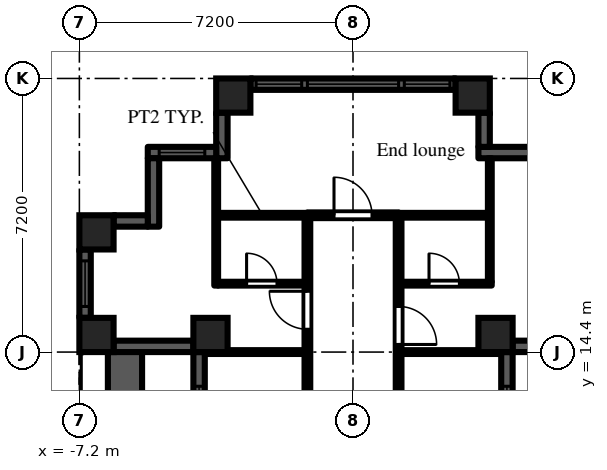
"""IFC4 building model, lengths in metres.
Left out: names, types, materials, properties, quantities, classifications, styles, units other than length and angle.
Written with IfcOpenShell. Run it as: python <this file> out.ifc"""

import sys

from ifc_helpers import new_model, si_unit, direction, frame, frame_2d, origin, origin_2d, place, context, subcontext, project, spatial, rectangle, extrude, element, fill, save


model = new_model("IFC4")
c1 = context("Model", 3, precision=1e-05, world=origin(), true_north=direction((0.0, 1.0)))
c2 = subcontext(c1, "Body", "Model", "MODEL_VIEW")
j1 = project(units=[si_unit("LENGTHUNIT", "METRE"), si_unit("PLANEANGLEUNIT", "RADIAN")], contexts=[c1])
p1 = place(None, origin())
s1 = spatial("IfcSite", under=j1, at=p1, CompositionType="ELEMENT")
p2 = place(p1, origin())
s2 = spatial("IfcBuilding", under=s1, at=p2, CompositionType="ELEMENT")
p3 = place(p2, frame((0.0, 0.0, 69.9)))
s3 = spatial("IfcBuildingStorey", under=s2, at=p3, CompositionType="ELEMENT", Elevation=69.9)
for number, where, z_axis, x_axis in (
    (1, (-6.75, 14.85, 0.0), (0.0, 0.0, 1.0), (1.0, 0.0, 0.0)),
    (2, (-6.75, 17.55, 0.0), (0.0, 0.0, 1.0), (1.0, 0.0, 0.0)),
    (3, (-3.75, 14.85, 0.0), (0.0, 0.0, 1.0), (1.0, 0.0, 0.0)),
    (4, (-3.15, 21.15, 0.0), (0.0, 0.0, 1.0), (1.0, 0.0, 0.0)),
    (5, (3.15, 21.15, 0.0), (0.0, 0.0, 1.0), (1.0, 0.0, 0.0)),
    (6, (3.75, 14.85, 0.0), (0.0, 0.0, 1.0), (1.0, 0.0, 0.0)),
):
    element("IfcColumn", number, at=place(p3, frame(where, z_axis=z_axis, x_axis=x_axis)), inside=s3, PredefinedType="COLUMN", context=c2, shape_type="SweptSolid", body=[
        extrude(rectangle(XDim=0.9, YDim=0.9, at=origin_2d()), origin(), (0.0, 0.0, 1.0), 3.0),
    ])
p4 = place(p3, frame((4.05, 7.2, 0.0), z_axis=(0.0, 0.0, 1.0), x_axis=(0.0, 1.0, 0.0)))
e7 = element("IfcWall", 7, at=p4, inside=s3, PredefinedType="SOLIDWALL", context=c2, shape_type="SweptSolid", body=[
    extrude(rectangle(XDim=7.2, YDim=0.3, at=frame_2d((3.6, 0.0))), origin(), (0.0, 0.0, 1.0), 2.1),
])
p5 = place(p4, frame((3.0, 0.0, 0.0)))
e8 = element("IfcOpeningElement", 8, at=p5, cuts=e7, PredefinedType="OPENING", context=c2, shape_type="SweptSolid", body=[
    extrude(rectangle(XDim=1.2, YDim=2.05, at=frame_2d((0.6, 1.025))), frame((0.0, 0.16, 0.0), z_axis=(0.0, -1.0, 0.0), x_axis=(1.0, 0.0, 0.0)), (0.0, 0.0, 1.0), 0.32),
])
p6 = place(p4, frame((0.9, 0.0, 0.2)))
e9 = element("IfcOpeningElement", 9, at=p6, cuts=e7, PredefinedType="OPENING", context=c2, shape_type="SweptSolid", body=[
    extrude(rectangle(XDim=1.8, YDim=1.85, at=frame_2d((0.9, 0.925))), frame((0.0, 0.16, 0.0), z_axis=(0.0, -1.0, 0.0), x_axis=(1.0, 0.0, 0.0)), (0.0, 0.0, 1.0), 0.32),
])
p7 = place(p4, frame((4.5, 0.0, 0.2)))
e10 = element("IfcOpeningElement", 10, at=p7, cuts=e7, PredefinedType="OPENING", context=c2, shape_type="SweptSolid", body=[
    extrude(rectangle(XDim=1.8, YDim=1.85, at=frame_2d((0.9, 0.925))), frame((0.0, 0.16, 0.0), z_axis=(0.0, -1.0, 0.0), x_axis=(1.0, 0.0, 0.0)), (0.0, 0.0, 1.0), 0.32),
])
p8 = place(p3, frame((4.2, 14.55, 0.0), z_axis=(0.0, 0.0, 1.0), x_axis=(1.0, 0.0, 0.0)))
e11 = element("IfcWall", 11, at=p8, inside=s3, PredefinedType="SOLIDWALL", context=c2, shape_type="SweptSolid", body=[
    extrude(rectangle(XDim=2.1, YDim=0.3, at=frame_2d((1.05, 0.0))), origin(), (0.0, 0.0, 1.0), 2.1),
])
p9 = place(p3, frame((5.1, 19.65, 0.0), z_axis=(0.0, 0.0, 1.0), x_axis=(-1.0, 0.0, 0.0)))
e12 = element("IfcWall", 12, at=p9, inside=s3, PredefinedType="SOLIDWALL", context=c2, shape_type="SweptSolid", body=[
    extrude(rectangle(XDim=1.8, YDim=0.3, at=frame_2d((0.9, 0.0))), origin(), (0.0, 0.0, 1.0), 2.575),
])
p10 = place(p3, frame((3.45, 19.8, 0.0), z_axis=(0.0, 0.0, 1.0), x_axis=(0.0, 1.0, 0.0)))
e13 = element("IfcWall", 13, at=p10, inside=s3, PredefinedType="SOLIDWALL", context=c2, shape_type="SweptSolid", body=[
    extrude(rectangle(XDim=0.9, YDim=0.3, at=frame_2d((0.45, 0.0))), origin(), (0.0, 0.0, 1.0), 2.575),
])
p11 = place(p3, frame((2.7, 21.45, 0.0), z_axis=(0.0, 0.0, 1.0), x_axis=(-1.0, 0.0, 0.0)))
e14 = element("IfcWall", 14, at=p11, inside=s3, PredefinedType="SOLIDWALL", context=c2, shape_type="SweptSolid", body=[
    extrude(rectangle(XDim=5.4, YDim=0.3, at=frame_2d((2.7, 0.0))), origin(), (0.0, 0.0, 1.0), 2.1),
])
p12 = place(p11, frame((1.5, 0.0, 0.2)))
e15 = element("IfcOpeningElement", 15, at=p12, cuts=e14, PredefinedType="OPENING", context=c2, shape_type="SweptSolid", body=[
    extrude(rectangle(XDim=2.4, YDim=1.85, at=frame_2d((1.2, 0.925))), frame((0.0, 0.16, 0.0), z_axis=(0.0, -1.0, 0.0), x_axis=(1.0, 0.0, 0.0)), (0.0, 0.0, 1.0), 0.32),
])
p13 = place(p11, frame((0.15, 0.0, 0.2)))
e16 = element("IfcOpeningElement", 16, at=p13, cuts=e14, PredefinedType="OPENING", context=c2, shape_type="SweptSolid", body=[
    extrude(rectangle(XDim=1.2, YDim=1.85, at=frame_2d((0.6, 0.925))), frame((0.0, 0.16, 0.0), z_axis=(0.0, -1.0, 0.0), x_axis=(1.0, 0.0, 0.0)), (0.0, 0.0, 1.0), 0.32),
])
p14 = place(p11, frame((4.05, 0.0, 0.2)))
e17 = element("IfcOpeningElement", 17, at=p14, cuts=e14, PredefinedType="OPENING", context=c2, shape_type="SweptSolid", body=[
    extrude(rectangle(XDim=1.2, YDim=1.85, at=frame_2d((0.6, 0.925))), frame((0.0, 0.16, 0.0), z_axis=(0.0, -1.0, 0.0), x_axis=(1.0, 0.0, 0.0)), (0.0, 0.0, 1.0), 0.32),
])
p15 = place(p3, frame((-3.45, 20.7, 0.0), z_axis=(0.0, 0.0, 1.0), x_axis=(0.0, -1.0, 0.0)))
e18 = element("IfcWall", 18, at=p15, inside=s3, PredefinedType="SOLIDWALL", context=c2, shape_type="SweptSolid", body=[
    extrude(rectangle(XDim=1.2, YDim=0.3, at=frame_2d((0.6, 0.0))), origin(), (0.0, 0.0, 1.0), 2.575),
])
p16 = place(p3, frame((-3.6, 19.65, 0.0), z_axis=(0.0, 0.0, 1.0), x_axis=(-1.0, 0.0, 0.0)))
e19 = element("IfcWall", 19, at=p16, inside=s3, PredefinedType="SOLIDWALL", context=c2, shape_type="SweptSolid", body=[
    extrude(rectangle(XDim=1.8, YDim=0.3, at=frame_2d((0.9, 0.0))), origin(), (0.0, 0.0, 1.0), 2.575),
])
p17 = place(p16, frame((0.3, 0.0, 0.2)))
e20 = element("IfcOpeningElement", 20, at=p17, cuts=e19, PredefinedType="OPENING", context=c2, shape_type="SweptSolid", body=[
    extrude(rectangle(XDim=1.2, YDim=1.85, at=frame_2d((0.6, 0.925))), frame((0.0, 0.16, 0.0), z_axis=(0.0, -1.0, 0.0), x_axis=(1.0, 0.0, 0.0)), (0.0, 0.0, 1.0), 0.32),
])
p18 = place(p3, frame((-5.25, 19.5, 0.0), z_axis=(0.0, 0.0, 1.0), x_axis=(0.0, -1.0, 0.0)))
e21 = element("IfcWall", 21, at=p18, inside=s3, PredefinedType="SOLIDWALL", context=c2, shape_type="SweptSolid", body=[
    extrude(rectangle(XDim=1.8, YDim=0.3, at=frame_2d((0.9, 0.0))), origin(), (0.0, 0.0, 1.0), 2.575),
])
p19 = place(p3, frame((-5.4, 17.85, 0.0), z_axis=(0.0, 0.0, 1.0), x_axis=(-1.0, 0.0, 0.0)))
e22 = element("IfcWall", 22, at=p19, inside=s3, PredefinedType="SOLIDWALL", context=c2, shape_type="SweptSolid", body=[
    extrude(rectangle(XDim=0.9, YDim=0.3, at=frame_2d((0.45, 0.0))), origin(), (0.0, 0.0, 1.0), 2.575),
])
p20 = place(p3, frame((-7.05, 17.1, 0.0), z_axis=(0.0, 0.0, 1.0), x_axis=(0.0, -1.0, 0.0)))
e23 = element("IfcWall", 23, at=p20, inside=s3, PredefinedType="SOLIDWALL", context=c2, shape_type="SweptSolid", body=[
    extrude(rectangle(XDim=1.8, YDim=0.3, at=frame_2d((0.9, 0.0))), origin(), (0.0, 0.0, 1.0), 2.1),
])
p21 = place(p20, frame((0.3, 0.0, 0.2)))
e24 = element("IfcOpeningElement", 24, at=p21, cuts=e23, PredefinedType="OPENING", context=c2, shape_type="SweptSolid", body=[
    extrude(rectangle(XDim=1.2, YDim=1.85, at=frame_2d((0.6, 0.925))), frame((0.0, 0.16, 0.0), z_axis=(0.0, -1.0, 0.0), x_axis=(1.0, 0.0, 0.0)), (0.0, 0.0, 1.0), 0.32),
])
p22 = place(p3, frame((-6.3, 14.55, 0.0), z_axis=(0.0, 0.0, 1.0), x_axis=(1.0, 0.0, 0.0)))
e25 = element("IfcWall", 25, at=p22, inside=s3, PredefinedType="SOLIDWALL", context=c2, shape_type="SweptSolid", body=[
    extrude(rectangle(XDim=2.1, YDim=0.3, at=frame_2d((1.05, 0.0))), origin(), (0.0, 0.0, 1.0), 2.1),
])
p23 = place(p3, frame((-4.05, 14.4, 0.0), z_axis=(0.0, 0.0, 1.0), x_axis=(0.0, -1.0, 0.0)))
e26 = element("IfcWall", 26, at=p23, inside=s3, PredefinedType="SOLIDWALL", context=c2, shape_type="SweptSolid", body=[
    extrude(rectangle(XDim=7.2, YDim=0.3, at=frame_2d((3.6, 0.0))), origin(), (0.0, 0.0, 1.0), 2.1),
])
p24 = place(p23, frame((3.0, 0.0, 0.0)))
e27 = element("IfcOpeningElement", 27, at=p24, cuts=e26, PredefinedType="OPENING", context=c2, shape_type="SweptSolid", body=[
    extrude(rectangle(XDim=1.2, YDim=2.05, at=frame_2d((0.6, 1.025))), frame((0.0, 0.16, 0.0), z_axis=(0.0, -1.0, 0.0), x_axis=(1.0, 0.0, 0.0)), (0.0, 0.0, 1.0), 0.32),
])
p25 = place(p23, frame((0.9, 0.0, 0.2)))
e28 = element("IfcOpeningElement", 28, at=p25, cuts=e26, PredefinedType="OPENING", context=c2, shape_type="SweptSolid", body=[
    extrude(rectangle(XDim=1.8, YDim=1.85, at=frame_2d((0.9, 0.925))), frame((0.0, 0.16, 0.0), z_axis=(0.0, -1.0, 0.0), x_axis=(1.0, 0.0, 0.0)), (0.0, 0.0, 1.0), 0.32),
])
p26 = place(p23, frame((4.5, 0.0, 0.2)))
e29 = element("IfcOpeningElement", 29, at=p26, cuts=e26, PredefinedType="OPENING", context=c2, shape_type="SweptSolid", body=[
    extrude(rectangle(XDim=1.8, YDim=1.85, at=frame_2d((0.9, 0.925))), frame((0.0, 0.16, 0.0), z_axis=(0.0, -1.0, 0.0), x_axis=(1.0, 0.0, 0.0)), (0.0, 0.0, 1.0), 0.32),
])
p27 = place(p3, frame((-6.0, 7.2, 0.0), z_axis=(0.0, 0.0, 1.0), x_axis=(0.0, 1.0, 0.0)))
e30 = element("IfcWall", 30, at=p27, inside=s3, PredefinedType="PARAPET", context=c2, shape_type="SweptSolid", body=[
    extrude(rectangle(XDim=7.2, YDim=0.9, at=frame_2d((3.6, 0.0))), origin(), (0.0, 0.0, 1.0), 0.8),
])
p28 = place(p3, frame((-3.9, 14.4, 0.0), z_axis=(0.0, 0.0, 1.0), x_axis=(1.0, 0.0, 0.0)))
e31 = element("IfcWall", 31, at=p28, inside=s3, PredefinedType="PARTITIONING", context=c2, shape_type="SweptSolid", body=[
    extrude(rectangle(XDim=2.625, YDim=0.1, at=frame_2d((1.312, 0.0))), origin(), (0.0, 0.0, 1.0), 2.575),
])
p29 = place(p3, frame((-3.6, 16.15, 0.0), z_axis=(0.0, 0.0, 1.0), x_axis=(0.0, 1.0, 0.0)))
e32 = element("IfcWall", 32, at=p29, inside=s3, PredefinedType="PARTITIONING", context=c2, shape_type="SweptSolid", body=[
    extrude(rectangle(XDim=3.35, YDim=0.1, at=frame_2d((1.675, 0.0))), origin(), (0.0, 0.0, 1.0), 2.575),
])
p30 = place(p3, frame((-3.55, 16.2, 0.0), z_axis=(0.0, 0.0, 1.0), x_axis=(1.0, 0.0, 0.0)))
e33 = element("IfcWall", 33, at=p30, inside=s3, PredefinedType="PARTITIONING", context=c2, shape_type="SweptSolid", body=[
    extrude(rectangle(XDim=2.275, YDim=0.1, at=frame_2d((1.138, 0.0))), origin(), (0.0, 0.0, 1.0), 2.575),
])
p31 = place(p30, frame((0.75, 0.0, 0.0)))
e34 = element("IfcOpeningElement", 34, at=p31, cuts=e33, PredefinedType="OPENING", context=c2, shape_type="SweptSolid", body=[
    extrude(rectangle(XDim=0.8, YDim=2.1, at=frame_2d((0.4, 1.05))), frame((0.0, 0.06, 0.0), z_axis=(0.0, -1.0, 0.0), x_axis=(1.0, 0.0, 0.0)), (0.0, 0.0, 1.0), 0.12),
])
p32 = place(p3, frame((-3.55, 18.0, 0.0), z_axis=(0.0, 0.0, 1.0), x_axis=(1.0, 0.0, 0.0)))
e35 = element("IfcWall", 35, at=p32, inside=s3, PredefinedType="PARTITIONING", context=c2, shape_type="SweptSolid", body=[
    extrude(rectangle(XDim=2.35, YDim=0.125, at=frame_2d((1.175, 0.0))), origin(), (0.0, 0.0, 1.0), 2.575),
])
p33 = place(p3, frame((-1.2, 1.275, 0.0), z_axis=(0.0, 0.0, 1.0), x_axis=(0.0, 1.0, 0.0)))
e36 = element("IfcWall", 36, at=p33, inside=s3, PredefinedType="PARTITIONING", context=c2, shape_type="SweptSolid", body=[
    extrude(rectangle(XDim=16.65, YDim=0.15, at=frame_2d((8.325, 0.0))), origin(), (0.0, 0.0, 1.0), 2.575),
])
p34 = place(p33, frame((0.675, 0.0, 0.0)))
e37 = element("IfcOpeningElement", 37, at=p34, cuts=e36, PredefinedType="OPENING", context=c2, shape_type="SweptSolid", body=[
    extrude(rectangle(XDim=0.9, YDim=2.1, at=frame_2d((0.45, 1.05))), frame((0.0, 0.085, 0.0), z_axis=(0.0, -1.0, 0.0), x_axis=(1.0, 0.0, 0.0)), (0.0, 0.0, 1.0), 0.17),
])
p35 = place(p33, frame((3.675, 0.0, 0.0)))
e38 = element("IfcOpeningElement", 38, at=p35, cuts=e36, PredefinedType="OPENING", context=c2, shape_type="SweptSolid", body=[
    extrude(rectangle(XDim=0.9, YDim=2.1, at=frame_2d((0.45, 1.05))), frame((0.0, 0.085, 0.0), z_axis=(0.0, -1.0, 0.0), x_axis=(1.0, 0.0, 0.0)), (0.0, 0.0, 1.0), 0.17),
])
p36 = place(p33, frame((10.875, 0.0, 0.0)))
e39 = element("IfcOpeningElement", 39, at=p36, cuts=e36, PredefinedType="OPENING", context=c2, shape_type="SweptSolid", body=[
    extrude(rectangle(XDim=0.9, YDim=2.1, at=frame_2d((0.45, 1.05))), frame((0.0, 0.085, 0.0), z_axis=(0.0, -1.0, 0.0), x_axis=(1.0, 0.0, 0.0)), (0.0, 0.0, 1.0), 0.17),
])
p37 = place(p33, frame((13.725, 0.0, 0.0)))
e40 = element("IfcOpeningElement", 40, at=p37, cuts=e36, PredefinedType="OPENING", context=c2, shape_type="SweptSolid", body=[
    extrude(rectangle(XDim=1.0, YDim=2.1, at=frame_2d((0.5, 1.05))), frame((0.0, 0.085, 0.0), z_axis=(0.0, -1.0, 0.0), x_axis=(1.0, 0.0, 0.0)), (0.0, 0.0, 1.0), 0.17),
])
p38 = place(p3, frame((-1.2, 18.0, 0.0), z_axis=(0.0, 0.0, 1.0), x_axis=(1.0, 0.0, 0.0)))
e41 = element("IfcWall", 41, at=p38, inside=s3, PredefinedType="PARTITIONING", context=c2, shape_type="SweptSolid", body=[
    extrude(rectangle(XDim=2.4, YDim=0.15, at=frame_2d((1.2, 0.0))), origin(), (0.0, 0.0, 1.0), 2.575),
])
p39 = place(p38, frame((0.7, 0.0, 0.0)))
e42 = element("IfcOpeningElement", 42, at=p39, cuts=e41, PredefinedType="OPENING", context=c2, shape_type="SweptSolid", body=[
    extrude(rectangle(XDim=1.0, YDim=2.1, at=frame_2d((0.5, 1.05))), frame((0.0, 0.085, 0.0), z_axis=(0.0, -1.0, 0.0), x_axis=(1.0, 0.0, 0.0)), (0.0, 0.0, 1.0), 0.17),
])
p40 = place(p3, frame((1.2, 1.125, 0.0), z_axis=(0.0, 0.0, 1.0), x_axis=(0.0, 1.0, 0.0)))
e43 = element("IfcWall", 43, at=p40, inside=s3, PredefinedType="PARTITIONING", context=c2, shape_type="SweptSolid", body=[
    extrude(rectangle(XDim=16.8, YDim=0.15, at=frame_2d((8.4, 0.0))), origin(), (0.0, 0.0, 1.0), 2.575),
])
p41 = place(p40, frame((7.025, 0.0, 0.0)))
e44 = element("IfcOpeningElement", 44, at=p41, cuts=e43, PredefinedType="OPENING", context=c2, shape_type="SweptSolid", body=[
    extrude(rectangle(XDim=0.9, YDim=2.1, at=frame_2d((0.45, 1.05))), frame((0.0, 0.085, 0.0), z_axis=(0.0, -1.0, 0.0), x_axis=(1.0, 0.0, 0.0)), (0.0, 0.0, 1.0), 0.17),
])
p42 = place(p40, frame((10.625, 0.0, 0.0)))
e45 = element("IfcOpeningElement", 45, at=p42, cuts=e43, PredefinedType="OPENING", context=c2, shape_type="SweptSolid", body=[
    extrude(rectangle(XDim=0.9, YDim=2.1, at=frame_2d((0.45, 1.05))), frame((0.0, 0.085, 0.0), z_axis=(0.0, -1.0, 0.0), x_axis=(1.0, 0.0, 0.0)), (0.0, 0.0, 1.0), 0.17),
])
p43 = place(p40, frame((13.475, 0.0, 0.0)))
e46 = element("IfcOpeningElement", 46, at=p43, cuts=e43, PredefinedType="OPENING", context=c2, shape_type="SweptSolid", body=[
    extrude(rectangle(XDim=1.0, YDim=2.1, at=frame_2d((0.5, 1.05))), frame((0.0, 0.085, 0.0), z_axis=(0.0, -1.0, 0.0), x_axis=(1.0, 0.0, 0.0)), (0.0, 0.0, 1.0), 0.17),
])
p44 = place(p3, frame((1.275, 14.4, 0.0), z_axis=(0.0, 0.0, 1.0), x_axis=(1.0, 0.0, 0.0)))
e47 = element("IfcWall", 47, at=p44, inside=s3, PredefinedType="PARTITIONING", context=c2, shape_type="SweptSolid", body=[
    extrude(rectangle(XDim=2.625, YDim=0.1, at=frame_2d((1.312, 0.0))), origin(), (0.0, 0.0, 1.0), 2.575),
])
p45 = place(p3, frame((1.275, 16.2, 0.0), z_axis=(0.0, 0.0, 1.0), x_axis=(1.0, 0.0, 0.0)))
e48 = element("IfcWall", 48, at=p45, inside=s3, PredefinedType="PARTITIONING", context=c2, shape_type="SweptSolid", body=[
    extrude(rectangle(XDim=2.375, YDim=0.1, at=frame_2d((1.188, 0.0))), origin(), (0.0, 0.0, 1.0), 2.575),
])
p46 = place(p45, frame((0.725, 0.0, 0.0)))
e49 = element("IfcOpeningElement", 49, at=p46, cuts=e48, PredefinedType="OPENING", context=c2, shape_type="SweptSolid", body=[
    extrude(rectangle(XDim=0.8, YDim=2.1, at=frame_2d((0.4, 1.05))), frame((0.0, 0.06, 0.0), z_axis=(0.0, -1.0, 0.0), x_axis=(1.0, 0.0, 0.0)), (0.0, 0.0, 1.0), 0.12),
])
p47 = place(p3, frame((1.2, 18.0, 0.0), z_axis=(0.0, 0.0, 1.0), x_axis=(1.0, 0.0, 0.0)))
e50 = element("IfcWall", 50, at=p47, inside=s3, PredefinedType="PARTITIONING", context=c2, shape_type="SweptSolid", body=[
    extrude(rectangle(XDim=2.35, YDim=0.125, at=frame_2d((1.175, 0.0))), origin(), (0.0, 0.0, 1.0), 2.575),
])
p48 = place(p3, frame((3.6, 16.25, 0.0), z_axis=(0.0, 0.0, 1.0), x_axis=(0.0, 1.0, 0.0)))
e51 = element("IfcWall", 51, at=p48, inside=s3, PredefinedType="PARTITIONING", context=c2, shape_type="SweptSolid", body=[
    extrude(rectangle(XDim=3.25, YDim=0.1, at=frame_2d((1.625, 0.0))), origin(), (0.0, 0.0, 1.0), 2.575),
])
p49 = place(p7, origin())
e52 = element("IfcWindow", 52, at=p49, inside=s3, PartitioningType="SINGLE_PANEL", PredefinedType="WINDOW", context=c2, shape_type="SweptSolid", body=[
    extrude(rectangle(XDim=1.8, YDim=1.85, at=frame_2d((0.9, 0.925))), frame((0.0, 0.03, 0.0), z_axis=(0.0, -1.0, 0.0), x_axis=(1.0, 0.0, 0.0)), (0.0, 0.0, 1.0), 0.06),
])
fill(e10, e52)
p50 = place(p12, origin())
e53 = element("IfcWindow", 53, at=p50, inside=s3, PartitioningType="SINGLE_PANEL", PredefinedType="WINDOW", context=c2, shape_type="SweptSolid", body=[
    extrude(rectangle(XDim=2.4, YDim=1.85, at=frame_2d((1.2, 0.925))), frame((0.0, 0.03, 0.0), z_axis=(0.0, -1.0, 0.0), x_axis=(1.0, 0.0, 0.0)), (0.0, 0.0, 1.0), 0.06),
])
fill(e15, e53)
p51 = place(p13, origin())
e54 = element("IfcWindow", 54, at=p51, inside=s3, PartitioningType="SINGLE_PANEL", PredefinedType="WINDOW", context=c2, shape_type="SweptSolid", body=[
    extrude(rectangle(XDim=1.2, YDim=1.85, at=frame_2d((0.6, 0.925))), frame((0.0, 0.03, 0.0), z_axis=(0.0, -1.0, 0.0), x_axis=(1.0, 0.0, 0.0)), (0.0, 0.0, 1.0), 0.06),
])
fill(e16, e54)
p52 = place(p14, origin())
e55 = element("IfcWindow", 55, at=p52, inside=s3, PartitioningType="SINGLE_PANEL", PredefinedType="WINDOW", context=c2, shape_type="SweptSolid", body=[
    extrude(rectangle(XDim=1.2, YDim=1.85, at=frame_2d((0.6, 0.925))), frame((0.0, 0.03, 0.0), z_axis=(0.0, -1.0, 0.0), x_axis=(1.0, 0.0, 0.0)), (0.0, 0.0, 1.0), 0.06),
])
fill(e17, e55)
p53 = place(p17, origin())
e56 = element("IfcWindow", 56, at=p53, inside=s3, PartitioningType="SINGLE_PANEL", PredefinedType="WINDOW", context=c2, shape_type="SweptSolid", body=[
    extrude(rectangle(XDim=1.2, YDim=1.85, at=frame_2d((0.6, 0.925))), frame((0.0, 0.03, 0.0), z_axis=(0.0, -1.0, 0.0), x_axis=(1.0, 0.0, 0.0)), (0.0, 0.0, 1.0), 0.06),
])
fill(e20, e56)
p54 = place(p21, origin())
e57 = element("IfcWindow", 57, at=p54, inside=s3, PartitioningType="SINGLE_PANEL", PredefinedType="WINDOW", context=c2, shape_type="SweptSolid", body=[
    extrude(rectangle(XDim=1.2, YDim=1.85, at=frame_2d((0.6, 0.925))), frame((0.0, 0.03, 0.0), z_axis=(0.0, -1.0, 0.0), x_axis=(1.0, 0.0, 0.0)), (0.0, 0.0, 1.0), 0.06),
])
fill(e24, e57)
p55 = place(p25, origin())
e58 = element("IfcWindow", 58, at=p55, inside=s3, PartitioningType="SINGLE_PANEL", PredefinedType="WINDOW", context=c2, shape_type="SweptSolid", body=[
    extrude(rectangle(XDim=1.8, YDim=1.85, at=frame_2d((0.9, 0.925))), frame((0.0, 0.03, 0.0), z_axis=(0.0, -1.0, 0.0), x_axis=(1.0, 0.0, 0.0)), (0.0, 0.0, 1.0), 0.06),
])
fill(e28, e58)
p56 = place(p39, origin())
e59 = element("IfcDoor", 59, at=p56, inside=s3, OperationType="SINGLE_SWING_LEFT", PredefinedType="DOOR", context=c2, shape_type="SweptSolid", body=[
    extrude(rectangle(XDim=1.0, YDim=2.1, at=frame_2d((0.5, 1.05))), frame((0.0, 0.025, 0.0), z_axis=(0.0, -1.0, 0.0), x_axis=(1.0, 0.0, 0.0)), (0.0, 0.0, 1.0), 0.05),
])
fill(e42, e59)
p57 = place(p31, origin())
e60 = element("IfcDoor", 60, at=p57, inside=s3, OperationType="SINGLE_SWING_LEFT", PredefinedType="DOOR", context=c2, shape_type="SweptSolid", body=[
    extrude(rectangle(XDim=0.8, YDim=2.1, at=frame_2d((0.4, 1.05))), frame((0.0, 0.025, 0.0), z_axis=(0.0, -1.0, 0.0), x_axis=(1.0, 0.0, 0.0)), (0.0, 0.0, 1.0), 0.05),
])
fill(e34, e60)
p58 = place(p37, origin())
e61 = element("IfcDoor", 61, at=p58, inside=s3, OperationType="SINGLE_SWING_RIGHT", PredefinedType="DOOR", context=c2, shape_type="SweptSolid", body=[
    extrude(rectangle(XDim=1.0, YDim=2.1, at=frame_2d((0.5, 1.05))), frame((0.0, 0.025, 0.0), z_axis=(0.0, -1.0, 0.0), x_axis=(1.0, 0.0, 0.0)), (0.0, 0.0, 1.0), 0.05),
])
fill(e40, e61)
p59 = place(p46, origin())
e62 = element("IfcDoor", 62, at=p59, inside=s3, OperationType="SINGLE_SWING_LEFT", PredefinedType="DOOR", context=c2, shape_type="SweptSolid", body=[
    extrude(rectangle(XDim=0.8, YDim=2.1, at=frame_2d((0.4, 1.05))), frame((0.0, 0.025, 0.0), z_axis=(0.0, -1.0, 0.0), x_axis=(1.0, 0.0, 0.0)), (0.0, 0.0, 1.0), 0.05),
])
fill(e49, e62)
p60 = place(p43, frame((1.0, 0.0, 0.0), z_axis=(0.0, 0.0, 1.0), x_axis=(-1.0, 0.0, 0.0)))
e63 = element("IfcDoor", 63, at=p60, inside=s3, OperationType="SINGLE_SWING_RIGHT", PredefinedType="DOOR", context=c2, shape_type="SweptSolid", body=[
    extrude(rectangle(XDim=1.0, YDim=2.1, at=frame_2d((0.5, 1.05))), frame((0.0, 0.025, 0.0), z_axis=(0.0, -1.0, 0.0), x_axis=(1.0, 0.0, 0.0)), (0.0, 0.0, 1.0), 0.05),
])
fill(e46, e63)
save(model, sys.argv[1])
